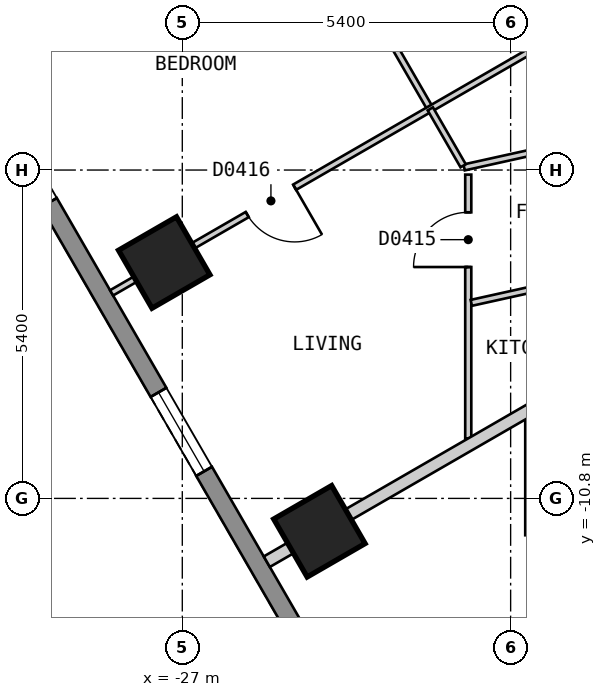
"""IFC4 building model, lengths in metres.
Left out: names, types, materials, properties, quantities, classifications, styles, units other than length and angle.
Written with IfcOpenShell. Run it as: python <this file> out.ifc"""

import sys

from ifc_helpers import new_model, si_unit, direction, frame, frame_2d, origin, origin_2d, place, context, subcontext, project, spatial, polyline, rectangle, outline, extrude, element, fill, save


model = new_model("IFC4")
c1 = context("Model", 3, precision=1e-05, world=origin(), true_north=direction((0.0, 1.0)))
c2 = subcontext(c1, "Body", "Model", "MODEL_VIEW")
j1 = project(units=[si_unit("LENGTHUNIT", "METRE"), si_unit("PLANEANGLEUNIT", "RADIAN")], contexts=[c1])
p1 = place(None, origin())
s1 = spatial("IfcSite", under=j1, at=p1, CompositionType="ELEMENT")
p2 = place(p1, origin())
s2 = spatial("IfcBuilding", under=s1, at=p2, CompositionType="ELEMENT")
p3 = place(p2, frame((0.0, 0.0, 32.4)))
s3 = spatial("IfcBuildingStorey", under=s2, at=p3, CompositionType="ELEMENT", Elevation=32.4)
for number, where, z_axis, x_axis in (
    (1, (-27.297, -6.921, 0.0), (0.0, 0.0, 1.0), (0.5, -0.866, 0.0)),
    (2, (-24.745, -11.341, 0.0), (0.0, 0.0, 1.0), (0.5, -0.866, 0.0)),
):
    element("IfcColumn", number, at=place(p3, frame(where, z_axis=z_axis, x_axis=x_axis)), inside=s3, PredefinedType="COLUMN", context=c2, shape_type="SweptSolid", body=[
        extrude(rectangle(XDim=1.1, YDim=1.1, at=origin_2d()), origin(), (0.0, 0.0, 1.0), 3.0),
    ])
p4 = place(p3, frame((-31.22, -2.425, 0.0), z_axis=(0.0, 0.0, 1.0), x_axis=(0.500001938803, -0.866024284413, 0.0)))
e3 = element("IfcWall", 3, at=p4, inside=s3, PredefinedType="SOLIDWALL", context=c2, shape_type="SweptSolid", body=[
    extrude(outline(polyline([(0.0, -0.15), (27.02, -0.15), (26.94, 0.15), (0.08, 0.15), (0.0, -0.15)])), origin(), (0.0, 0.0, 1.0), 2.7),
])
p5 = place(p4, frame((2.553, 0.0, 0.15)))
e4 = element("IfcOpeningElement", 4, at=p5, cuts=e3, PredefinedType="OPENING", context=c2, shape_type="SweptSolid", body=[
    extrude(rectangle(XDim=1.5, YDim=2.1, at=frame_2d((0.75, 1.05))), frame((0.0, 0.16, 0.0), z_axis=(0.0, -1.0, 0.0), x_axis=(1.0, 0.0, 0.0)), (0.0, 0.0, 1.0), 0.32),
])
p6 = place(p4, frame((7.657, 0.0, 0.15)))
e5 = element("IfcOpeningElement", 5, at=p6, cuts=e3, PredefinedType="OPENING", context=c2, shape_type="SweptSolid", body=[
    extrude(rectangle(XDim=1.5, YDim=2.1, at=frame_2d((0.75, 1.05))), frame((0.0, 0.16, 0.0), z_axis=(0.0, -1.0, 0.0), x_axis=(1.0, 0.0, 0.0)), (0.0, 0.0, 1.0), 0.32),
])
p7 = place(p4, frame((12.761, 0.0, 0.15)))
e6 = element("IfcOpeningElement", 6, at=p7, cuts=e3, PredefinedType="OPENING", context=c2, shape_type="SweptSolid", body=[
    extrude(rectangle(XDim=1.5, YDim=2.1, at=frame_2d((0.75, 1.05))), frame((0.0, 0.16, 0.0), z_axis=(0.0, -1.0, 0.0), x_axis=(1.0, 0.0, 0.0)), (0.0, 0.0, 1.0), 0.32),
])
p8 = place(p4, frame((17.865, 0.0, 0.15)))
e7 = element("IfcOpeningElement", 7, at=p8, cuts=e3, PredefinedType="OPENING", context=c2, shape_type="SweptSolid", body=[
    extrude(rectangle(XDim=1.5, YDim=2.1, at=frame_2d((0.75, 1.05))), frame((0.0, 0.16, 0.0), z_axis=(0.0, -1.0, 0.0), x_axis=(1.0, 0.0, 0.0)), (0.0, 0.0, 1.0), 0.32),
])
p9 = place(p4, frame((22.969, 0.0, 0.15)))
e8 = element("IfcOpeningElement", 8, at=p9, cuts=e3, PredefinedType="OPENING", context=c2, shape_type="SweptSolid", body=[
    extrude(rectangle(XDim=1.5, YDim=2.1, at=frame_2d((0.75, 1.05))), frame((0.0, 0.16, 0.0), z_axis=(0.0, -1.0, 0.0), x_axis=(1.0, 0.0, 0.0)), (0.0, 0.0, 1.0), 0.32),
])
p10 = place(p3, frame((-25.358, -0.174, 0.0), z_axis=(0.0, 0.0, 1.0), x_axis=(0.500093956194, -0.865971151354, 0.0)))
e9 = element("IfcWall", 9, at=p10, inside=s3, PredefinedType="PARTITIONING", context=c2, shape_type="SweptSolid", body=[
    extrude(rectangle(XDim=4.873, YDim=0.1, at=frame_2d((2.437, 0.0))), origin(), (0.0, 0.0, 1.0), 2.7),
])
p11 = place(p10, frame((1.937, 0.0, 0.0)))
e10 = element("IfcOpeningElement", 10, at=p11, cuts=e9, PredefinedType="OPENING", context=c2, shape_type="SweptSolid", body=[
    extrude(rectangle(XDim=0.8, YDim=2.1, at=frame_2d((0.4, 1.05))), frame((0.0, 0.06, 0.0), z_axis=(0.0, -1.0, 0.0), x_axis=(1.0, 0.0, 0.0)), (0.0, 0.0, 1.0), 0.12),
])
p12 = place(p3, frame((-21.31, -9.474, 0.0), z_axis=(0.0, 0.0, 1.0), x_axis=(0.0, -1.0, 0.0)))
e11 = element("IfcWall", 11, at=p12, inside=s3, PredefinedType="PARTITIONING", context=c2, shape_type="SweptSolid", body=[
    extrude(rectangle(XDim=1.932, YDim=0.1, at=frame_2d((0.966, 0.0))), origin(), (0.0, 0.0, 1.0), 2.7),
])
p13 = place(p3, frame((-22.297, -9.813, 0.0), z_axis=(0.0, 0.0, 1.0), x_axis=(0.0, 1.0, 0.0)))
e12 = element("IfcWall", 12, at=p13, inside=s3, PredefinedType="PARTITIONING", context=c2, shape_type="SweptSolid", body=[
    extrude(rectangle(XDim=4.338, YDim=0.1, at=frame_2d((2.169, 0.0))), origin(), (0.0, 0.0, 1.0), 2.7),
])
p14 = place(p13, frame((2.818, 0.0, 0.0)))
e13 = element("IfcOpeningElement", 13, at=p14, cuts=e12, PredefinedType="OPENING", context=c2, shape_type="SweptSolid", body=[
    extrude(rectangle(XDim=0.9, YDim=2.1, at=frame_2d((0.45, 1.05))), frame((0.0, 0.06, 0.0), z_axis=(0.0, -1.0, 0.0), x_axis=(1.0, 0.0, 0.0)), (0.0, 0.0, 1.0), 0.12),
])
p15 = place(p3, frame((-22.365, -5.357, 0.0), z_axis=(0.0, 0.0, 1.0), x_axis=(0.976339488582, 0.216243388421, 0.0)))
e14 = element("IfcWall", 14, at=p15, inside=s3, PredefinedType="PARTITIONING", context=c2, shape_type="SweptSolid", body=[
    extrude(rectangle(XDim=4.139, YDim=0.1, at=frame_2d((2.069, 0.0))), origin(), (0.0, 0.0, 1.0), 2.7),
])
p16 = place(p15, frame((1.722, 0.0, 0.0)))
e15 = element("IfcOpeningElement", 15, at=p16, cuts=e14, PredefinedType="OPENING", context=c2, shape_type="SweptSolid", body=[
    extrude(rectangle(XDim=0.8, YDim=2.1, at=frame_2d((0.4, 1.05))), frame((0.0, 0.06, 0.0), z_axis=(0.0, -1.0, 0.0), x_axis=(1.0, 0.0, 0.0)), (0.0, 0.0, 1.0), 0.12),
])
p17 = place(p3, frame((-22.247, -7.584, 0.0), z_axis=(0.0, 0.0, 1.0), x_axis=(0.97635375062, 0.216178985219, 0.0)))
e16 = element("IfcWall", 16, at=p17, inside=s3, PredefinedType="PARTITIONING", context=c2, shape_type="SweptSolid", body=[
    extrude(rectangle(XDim=4.094, YDim=0.1, at=frame_2d((2.047, 0.0))), origin(), (0.0, 0.0, 1.0), 2.7),
])
p18 = place(p17, frame((1.571, 0.0, 0.0)))
e17 = element("IfcOpeningElement", 17, at=p18, cuts=e16, PredefinedType="OPENING", context=c2, shape_type="SweptSolid", body=[
    extrude(rectangle(XDim=0.9, YDim=2.1, at=frame_2d((0.45, 1.05))), frame((0.0, 0.06, 0.0), z_axis=(0.0, -1.0, 0.0), x_axis=(1.0, 0.0, 0.0)), (0.0, 0.0, 1.0), 0.12),
])
p19 = place(p3, frame((-28.163, -7.42, 0.0), z_axis=(0.0, 0.0, 1.0), x_axis=(0.866065245018, 0.499930986609, 0.0)))
e18 = element("IfcWall", 18, at=p19, inside=s3, PredefinedType="PARTITIONING", context=c2, shape_type="SweptSolid", body=[
    extrude(rectangle(XDim=10.0, YDim=0.1, at=frame_2d((5.0, 0.0))), origin(), (0.0, 0.0, 1.0), 2.7),
])
p20 = place(p19, frame((2.576, 0.0, 0.0)))
e19 = element("IfcOpeningElement", 19, at=p20, cuts=e18, PredefinedType="OPENING", context=c2, shape_type="SweptSolid", body=[
    extrude(rectangle(XDim=0.9, YDim=2.1, at=frame_2d((0.45, 1.05))), frame((0.0, 0.06, 0.0), z_axis=(0.0, -1.0, 0.0), x_axis=(1.0, 0.0, 0.0)), (0.0, 0.0, 1.0), 0.12),
])
p21 = place(p3, frame((-25.61, -11.841, 0.0), z_axis=(0.0, 0.0, 1.0), x_axis=(0.866019023803, 0.500011050288, 0.0)))
e20 = element("IfcWall", 20, at=p21, inside=s3, PredefinedType="PARTITIONING", context=c2, shape_type="SweptSolid", body=[
    extrude(rectangle(XDim=8.47, YDim=0.2, at=frame_2d((4.235, 0.0))), origin(), (0.0, 0.0, 1.0), 2.7),
])
p22 = place(p3, frame((-22.921, -4.394, 0.0), z_axis=(0.0, 0.0, 1.0), x_axis=(0.499565963512, -0.866275849889, 0.0)))
e21 = element("IfcWall", 21, at=p22, inside=s3, PredefinedType="PARTITIONING", context=c2, shape_type="SweptSolid", body=[
    extrude(rectangle(XDim=1.081, YDim=0.1, at=frame_2d((0.54, 0.0))), origin(), (0.0, 0.0, 1.0), 2.7),
])
p23 = place(p6, origin())
e22 = element("IfcWindow", 22, at=p23, inside=s3, PartitioningType="SINGLE_PANEL", PredefinedType="WINDOW", context=c2, shape_type="SweptSolid", body=[
    extrude(rectangle(XDim=1.5, YDim=2.1, at=frame_2d((0.75, 1.05))), frame((0.0, 0.03, 0.0), z_axis=(0.0, -1.0, 0.0), x_axis=(1.0, 0.0, 0.0)), (0.0, 0.0, 1.0), 0.06),
])
fill(e5, e22)
p24 = place(p14, origin())
e23 = element("IfcDoor", 23, at=p24, inside=s3, OperationType="SINGLE_SWING_LEFT", PredefinedType="DOOR", context=c2, shape_type="SweptSolid", body=[
    extrude(rectangle(XDim=0.9, YDim=2.1, at=frame_2d((0.45, 1.05))), frame((0.0, 0.025, 0.0), z_axis=(0.0, -1.0, 0.0), x_axis=(1.0, 0.0, 0.0)), (0.0, 0.0, 1.0), 0.05),
])
fill(e13, e23)
p25 = place(p20, origin())
e24 = element("IfcDoor", 24, at=p25, inside=s3, OperationType="SINGLE_SWING_RIGHT", PredefinedType="DOOR", context=c2, shape_type="SweptSolid", body=[
    extrude(rectangle(XDim=0.9, YDim=2.1, at=frame_2d((0.45, 1.05))), frame((0.0, 0.025, 0.0), z_axis=(0.0, -1.0, 0.0), x_axis=(1.0, 0.0, 0.0)), (0.0, 0.0, 1.0), 0.05),
])
fill(e19, e24)
save(model, sys.argv[1])
